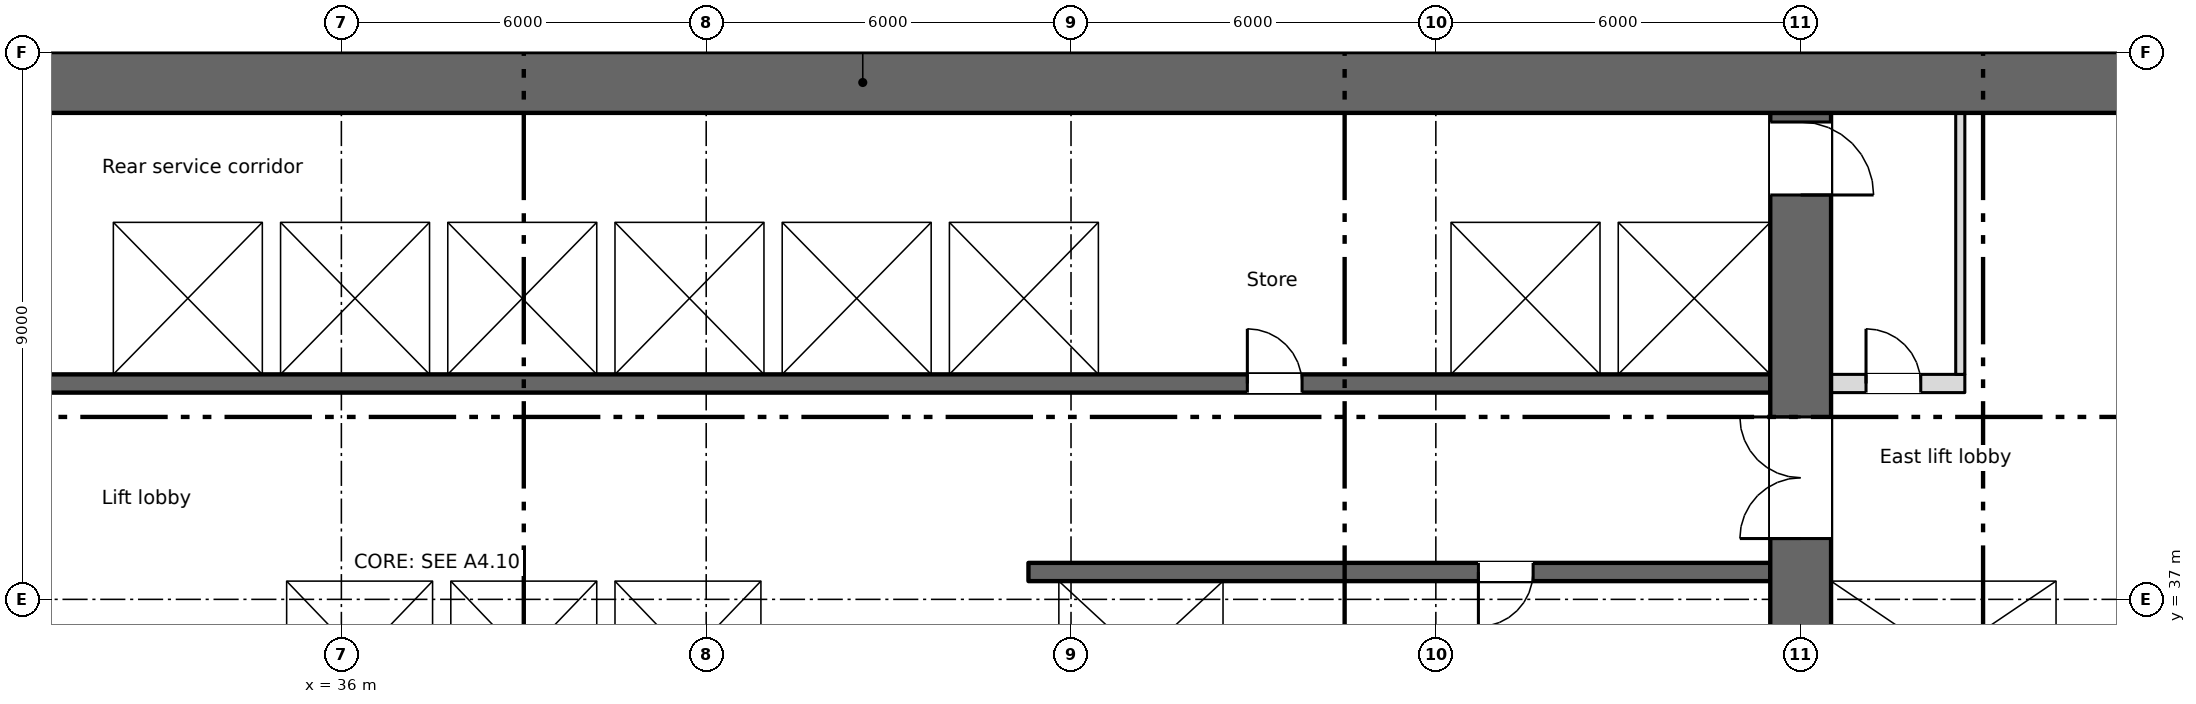
"""IFC4 building model, lengths in metres.
Left out: names, types, materials, properties, quantities, classifications, styles, units other than length and angle.
Written with IfcOpenShell. Run it as: python <this file> out.ifc"""

import sys

from ifc_helpers import new_model, si_unit, direction, frame, frame_2d, origin, place, context, subcontext, project, spatial, rectangle, extrude, element, fill, save


model = new_model("IFC4")
c1 = context("Model", 3, precision=1e-05, world=origin(), true_north=direction((0.0, 1.0)))
c2 = subcontext(c1, "Body", "Model", "MODEL_VIEW")
j1 = project(units=[si_unit("LENGTHUNIT", "METRE"), si_unit("PLANEANGLEUNIT", "RADIAN")], contexts=[c1])
p1 = place(None, origin())
s1 = spatial("IfcSite", under=j1, at=p1, CompositionType="ELEMENT")
p2 = place(p1, origin())
s2 = spatial("IfcBuilding", under=s1, at=p2, CompositionType="ELEMENT")
p3 = place(p2, frame((0.0, 0.0, 56.25)))
s3 = spatial("IfcBuildingStorey", under=s2, at=p3, CompositionType="ELEMENT", Elevation=56.25)
p4 = place(p3, frame((5.55, 45.5, 0.0), z_axis=(0.0, 0.0, 1.0), x_axis=(1.0, 0.0, 0.0)))
e1 = element("IfcWall", 1, at=p4, inside=s3, PredefinedType="SHEAR", context=c2, shape_type="SweptSolid", body=[
    extrude(rectangle(XDim=66.9, YDim=1.0, at=frame_2d((33.45, 0.0))), origin(), (0.0, 0.0, 1.0), 3.35),
])
p5 = place(p4, frame((1.2, 0.0, 0.6)))
e2 = element("IfcOpeningElement", 2, at=p5, cuts=e1, PredefinedType="OPENING", context=c2, shape_type="SweptSolid", body=[
    extrude(rectangle(XDim=0.6, YDim=2.4, at=frame_2d((0.3, 1.2))), frame((0.0, 0.51, 0.0), z_axis=(0.0, -1.0, 0.0), x_axis=(1.0, 0.0, 0.0)), (0.0, 0.0, 1.0), 1.02),
])
p6 = place(p4, frame((7.2, 0.0, 0.6)))
e3 = element("IfcOpeningElement", 3, at=p6, cuts=e1, PredefinedType="OPENING", context=c2, shape_type="SweptSolid", body=[
    extrude(rectangle(XDim=0.6, YDim=2.4, at=frame_2d((0.3, 1.2))), frame((0.0, 0.51, 0.0), z_axis=(0.0, -1.0, 0.0), x_axis=(1.0, 0.0, 0.0)), (0.0, 0.0, 1.0), 1.02),
])
p7 = place(p4, frame((61.2, 0.0, 0.6)))
e4 = element("IfcOpeningElement", 4, at=p7, cuts=e1, PredefinedType="OPENING", context=c2, shape_type="SweptSolid", body=[
    extrude(rectangle(XDim=0.6, YDim=2.4, at=frame_2d((0.3, 1.2))), frame((0.0, 0.51, 0.0), z_axis=(0.0, -1.0, 0.0), x_axis=(1.0, 0.0, 0.0)), (0.0, 0.0, 1.0), 1.02),
])
p8 = place(p3, frame((64.35, 34.8, 0.0), z_axis=(0.0, 0.0, 1.0), x_axis=(0.0, 1.0, 0.0)))
e5 = element("IfcWall", 5, at=p8, inside=s3, PredefinedType="SHEAR", context=c2, shape_type="SweptSolid", body=[
    extrude(rectangle(XDim=10.2, YDim=0.3, at=frame_2d((5.1, 0.0))), origin(), (0.0, 0.0, 1.0), 3.35),
])
p9 = place(p3, frame((60.0, 28.4, 0.0), z_axis=(0.0, 0.0, 1.0), x_axis=(0.0, 1.0, 0.0)))
e6 = element("IfcWall", 6, at=p9, inside=s3, PredefinedType="SHEAR", context=c2, shape_type="SweptSolid", body=[
    extrude(rectangle(XDim=16.6, YDim=1.0, at=frame_2d((8.3, 0.0))), origin(), (0.0, 0.0, 1.0), 3.35),
])
p10 = place(p9, frame((9.6, 0.0, 0.0)))
e7 = element("IfcOpeningElement", 7, at=p10, cuts=e6, PredefinedType="OPENING", context=c2, shape_type="SweptSolid", body=[
    extrude(rectangle(XDim=2.0, YDim=2.1, at=frame_2d((1.0, 1.05))), frame((0.0, 0.51, 0.0), z_axis=(0.0, -1.0, 0.0), x_axis=(1.0, 0.0, 0.0)), (0.0, 0.0, 1.0), 1.02),
])
p11 = place(p9, frame((15.25, 0.0, 0.0)))
e8 = element("IfcOpeningElement", 8, at=p11, cuts=e6, PredefinedType="OPENING", context=c2, shape_type="SweptSolid", body=[
    extrude(rectangle(XDim=1.2, YDim=2.1, at=frame_2d((0.6, 1.05))), frame((0.0, 0.51, 0.0), z_axis=(0.0, -1.0, 0.0), x_axis=(1.0, 0.0, 0.0)), (0.0, 0.0, 1.0), 1.02),
])
p12 = place(p3, frame((34.8, 37.45, 0.0), z_axis=(0.0, 0.0, 1.0), x_axis=(1.0, 0.0, 0.0)))
e9 = element("IfcWall", 9, at=p12, inside=s3, PredefinedType="SHEAR", context=c2, shape_type="SweptSolid", body=[
    extrude(rectangle(XDim=8.4, YDim=0.3, at=frame_2d((4.2, 0.0))), origin(), (0.0, 0.0, 1.0), 3.35),
])
p13 = place(p12, frame((0.95, 0.0, 0.0)))
e10 = element("IfcOpeningElement", 10, at=p13, cuts=e9, PredefinedType="OPENING", context=c2, shape_type="SweptSolid", body=[
    extrude(rectangle(XDim=1.1, YDim=2.1, at=frame_2d((0.55, 1.05))), frame((0.0, 0.16, 0.0), z_axis=(0.0, -1.0, 0.0), x_axis=(1.0, 0.0, 0.0)), (0.0, 0.0, 1.0), 0.32),
])
p14 = place(p12, frame((3.65, 0.0, 0.0)))
e11 = element("IfcOpeningElement", 11, at=p14, cuts=e9, PredefinedType="OPENING", context=c2, shape_type="SweptSolid", body=[
    extrude(rectangle(XDim=1.1, YDim=2.1, at=frame_2d((0.55, 1.05))), frame((0.0, 0.16, 0.0), z_axis=(0.0, -1.0, 0.0), x_axis=(1.0, 0.0, 0.0)), (0.0, 0.0, 1.0), 0.32),
])
p15 = place(p12, frame((6.35, 0.0, 0.0)))
e12 = element("IfcOpeningElement", 12, at=p15, cuts=e9, PredefinedType="OPENING", context=c2, shape_type="SweptSolid", body=[
    extrude(rectangle(XDim=1.1, YDim=2.1, at=frame_2d((0.55, 1.05))), frame((0.0, 0.16, 0.0), z_axis=(0.0, -1.0, 0.0), x_axis=(1.0, 0.0, 0.0)), (0.0, 0.0, 1.0), 0.32),
])
p16 = place(p3, frame((59.5, 37.45, 0.0), z_axis=(0.0, 0.0, 1.0), x_axis=(-1.0, 0.0, 0.0)))
e13 = element("IfcWall", 13, at=p16, inside=s3, PredefinedType="SHEAR", context=c2, shape_type="SweptSolid", body=[
    extrude(rectangle(XDim=12.2, YDim=0.3, at=frame_2d((6.1, 0.0))), origin(), (0.0, 0.0, 1.0), 3.35),
])
p17 = place(p16, frame((3.9, 0.0, 0.0)))
e14 = element("IfcOpeningElement", 14, at=p17, cuts=e13, PredefinedType="OPENING", context=c2, shape_type="SweptSolid", body=[
    extrude(rectangle(XDim=0.9, YDim=2.1, at=frame_2d((0.45, 1.05))), frame((0.0, 0.16, 0.0), z_axis=(0.0, -1.0, 0.0), x_axis=(1.0, 0.0, 0.0)), (0.0, 0.0, 1.0), 0.32),
])
p18 = place(p3, frame((60.5, 37.45, 0.0), z_axis=(0.0, 0.0, 1.0), x_axis=(1.0, 0.0, 0.0)))
e15 = element("IfcWall", 15, at=p18, inside=s3, PredefinedType="SHEAR", context=c2, shape_type="SweptSolid", body=[
    extrude(rectangle(XDim=3.7, YDim=0.3, at=frame_2d((1.85, 0.0))), origin(), (0.0, 0.0, 1.0), 3.35),
])
p19 = place(p18, frame((1.3, 0.0, 0.0)))
e16 = element("IfcOpeningElement", 16, at=p19, cuts=e15, PredefinedType="OPENING", context=c2, shape_type="SweptSolid", body=[
    extrude(rectangle(XDim=1.1, YDim=2.1, at=frame_2d((0.55, 1.05))), frame((0.0, 0.16, 0.0), z_axis=(0.0, -1.0, 0.0), x_axis=(1.0, 0.0, 0.0)), (0.0, 0.0, 1.0), 0.32),
])
for number, where, z_axis, x_axis in (
    (17, (34.95, 34.8, 0.0), (0.0, 0.0, 1.0), (0.0, 1.0, 0.0)),
    (18, (43.05, 34.8, 0.0), (0.0, 0.0, 1.0), (0.0, 1.0, 0.0)),
):
    element("IfcWall", number, at=place(p3, frame(where, z_axis=z_axis, x_axis=x_axis)), inside=s3, PredefinedType="SHEAR", context=c2, shape_type="SweptSolid", body=[
        extrude(rectangle(XDim=2.5, YDim=0.3, at=frame_2d((1.25, 0.0))), origin(), (0.0, 0.0, 1.0), 3.35),
    ])
p20 = place(p3, frame((47.55, 34.8, 0.0), z_axis=(0.0, 0.0, 1.0), x_axis=(0.0, 1.0, 0.0)))
e19 = element("IfcWall", 19, at=p20, inside=s3, PredefinedType="SHEAR", context=c2, shape_type="SweptSolid", body=[
    extrude(rectangle(XDim=2.5, YDim=0.5, at=frame_2d((1.25, 0.0))), origin(), (0.0, 0.0, 1.0), 3.35),
])
p21 = place(p3, frame((50.65, 34.8, 0.0), z_axis=(0.0, 0.0, 1.0), x_axis=(0.0, 1.0, 0.0)))
e20 = element("IfcWall", 20, at=p21, inside=s3, PredefinedType="SHEAR", context=c2, shape_type="SweptSolid", body=[
    extrude(rectangle(XDim=2.5, YDim=0.3, at=frame_2d((1.25, 0.0))), origin(), (0.0, 0.0, 1.0), 3.35),
])
p22 = place(p3, frame((18.5, 40.55, 0.0), z_axis=(0.0, 0.0, 1.0), x_axis=(1.0, 0.0, 0.0)))
e21 = element("IfcWall", 21, at=p22, inside=s3, PredefinedType="SHEAR", context=c2, shape_type="SweptSolid", body=[
    extrude(rectangle(XDim=41.0, YDim=0.3, at=frame_2d((20.5, 0.0))), origin(), (0.0, 0.0, 1.0), 3.35),
])
p23 = place(p22, frame((9.025, 0.0, 0.0)))
e22 = element("IfcOpeningElement", 22, at=p23, cuts=e21, PredefinedType="OPENING", context=c2, shape_type="SweptSolid", body=[
    extrude(rectangle(XDim=0.9, YDim=2.1, at=frame_2d((0.45, 1.05))), frame((0.0, 0.16, 0.0), z_axis=(0.0, -1.0, 0.0), x_axis=(1.0, 0.0, 0.0)), (0.0, 0.0, 1.0), 0.32),
])
p24 = place(p22, frame((32.4, 0.0, 0.0)))
e23 = element("IfcOpeningElement", 23, at=p24, cuts=e21, PredefinedType="OPENING", context=c2, shape_type="SweptSolid", body=[
    extrude(rectangle(XDim=0.9, YDim=2.1, at=frame_2d((0.45, 1.05))), frame((0.0, 0.16, 0.0), z_axis=(0.0, -1.0, 0.0), x_axis=(1.0, 0.0, 0.0)), (0.0, 0.0, 1.0), 0.32),
])
p25 = place(p22, frame((14.425, 0.0, 0.0)))
e24 = element("IfcOpeningElement", 24, at=p25, cuts=e21, PredefinedType="OPENING", context=c2, shape_type="SweptSolid", body=[
    extrude(rectangle(XDim=1.1, YDim=2.1, at=frame_2d((0.55, 1.05))), frame((0.0, 0.16, 0.0), z_axis=(0.0, -1.0, 0.0), x_axis=(1.0, 0.0, 0.0)), (0.0, 0.0, 1.0), 0.32),
])
p26 = place(p22, frame((17.175, 0.0, 0.0)))
e25 = element("IfcOpeningElement", 25, at=p26, cuts=e21, PredefinedType="OPENING", context=c2, shape_type="SweptSolid", body=[
    extrude(rectangle(XDim=1.1, YDim=2.1, at=frame_2d((0.55, 1.05))), frame((0.0, 0.16, 0.0), z_axis=(0.0, -1.0, 0.0), x_axis=(1.0, 0.0, 0.0)), (0.0, 0.0, 1.0), 0.32),
])
p27 = place(p22, frame((19.925, 0.0, 0.0)))
e26 = element("IfcOpeningElement", 26, at=p27, cuts=e21, PredefinedType="OPENING", context=c2, shape_type="SweptSolid", body=[
    extrude(rectangle(XDim=1.1, YDim=2.1, at=frame_2d((0.55, 1.05))), frame((0.0, 0.16, 0.0), z_axis=(0.0, -1.0, 0.0), x_axis=(1.0, 0.0, 0.0)), (0.0, 0.0, 1.0), 0.32),
])
p28 = place(p22, frame((22.675, 0.0, 0.0)))
e27 = element("IfcOpeningElement", 27, at=p28, cuts=e21, PredefinedType="OPENING", context=c2, shape_type="SweptSolid", body=[
    extrude(rectangle(XDim=1.1, YDim=2.1, at=frame_2d((0.55, 1.05))), frame((0.0, 0.16, 0.0), z_axis=(0.0, -1.0, 0.0), x_axis=(1.0, 0.0, 0.0)), (0.0, 0.0, 1.0), 0.32),
])
p29 = place(p22, frame((36.375, 0.0, 0.0)))
e28 = element("IfcOpeningElement", 28, at=p29, cuts=e21, PredefinedType="OPENING", context=c2, shape_type="SweptSolid", body=[
    extrude(rectangle(XDim=1.2, YDim=2.1, at=frame_2d((0.6, 1.05))), frame((0.0, 0.16, 0.0), z_axis=(0.0, -1.0, 0.0), x_axis=(1.0, 0.0, 0.0)), (0.0, 0.0, 1.0), 0.32),
])
p30 = place(p22, frame((39.15, 0.0, 0.0)))
e29 = element("IfcOpeningElement", 29, at=p30, cuts=e21, PredefinedType="OPENING", context=c2, shape_type="SweptSolid", body=[
    extrude(rectangle(XDim=1.2, YDim=2.1, at=frame_2d((0.6, 1.05))), frame((0.0, 0.16, 0.0), z_axis=(0.0, -1.0, 0.0), x_axis=(1.0, 0.0, 0.0)), (0.0, 0.0, 1.0), 0.32),
])
p31 = place(p3, frame((18.5, 43.35, 0.0), z_axis=(0.0, 0.0, 1.0), x_axis=(1.0, 0.0, 0.0)))
e30 = element("IfcWall", 30, at=p31, inside=s3, PredefinedType="SHEAR", context=c2, shape_type="SweptSolid", body=[
    extrude(rectangle(XDim=41.0, YDim=0.3, at=frame_2d((20.5, 0.0))), origin(), (0.0, 0.0, 1.0), 3.35),
])
p32 = place(p3, frame((60.5, 40.55, 0.0), z_axis=(0.0, 0.0, 1.0), x_axis=(1.0, 0.0, 0.0)))
e31 = element("IfcWall", 31, at=p32, inside=s3, PredefinedType="PARTITIONING", context=c2, shape_type="SweptSolid", body=[
    extrude(rectangle(XDim=2.2, YDim=0.3, at=frame_2d((1.1, 0.0))), origin(), (0.0, 0.0, 1.0), 3.35),
])
p33 = place(p32, frame((0.575, 0.0, 0.0)))
e32 = element("IfcOpeningElement", 32, at=p33, cuts=e31, PredefinedType="OPENING", context=c2, shape_type="SweptSolid", body=[
    extrude(rectangle(XDim=0.9, YDim=2.1, at=frame_2d((0.45, 1.05))), frame((0.0, 0.16, 0.0), z_axis=(0.0, -1.0, 0.0), x_axis=(1.0, 0.0, 0.0)), (0.0, 0.0, 1.0), 0.32),
])
for number, where, z_axis, x_axis in (
    (33, (37.65, 34.8, 0.0), (0.0, 0.0, 1.0), (0.0, 1.0, 0.0)),
    (34, (40.35, 34.8, 0.0), (0.0, 0.0, 1.0), (0.0, 1.0, 0.0)),
    (35, (32.1, 40.7, 0.0), (0.0, 0.0, 1.0), (0.0, 1.0, 0.0)),
    (36, (34.85, 40.7, 0.0), (0.0, 0.0, 1.0), (0.0, 1.0, 0.0)),
    (37, (37.6, 40.7, 0.0), (0.0, 0.0, 1.0), (0.0, 1.0, 0.0)),
    (38, (40.35, 40.7, 0.0), (0.0, 0.0, 1.0), (0.0, 1.0, 0.0)),
    (39, (43.1, 40.7, 0.0), (0.0, 0.0, 1.0), (0.0, 1.0, 0.0)),
    (40, (45.85, 40.7, 0.0), (0.0, 0.0, 1.0), (0.0, 1.0, 0.0)),
    (41, (48.6, 40.7, 0.0), (0.0, 0.0, 1.0), (0.0, 1.0, 0.0)),
    (42, (54.1, 40.7, 0.0), (0.0, 0.0, 1.0), (0.0, 1.0, 0.0)),
    (43, (56.85, 40.7, 0.0), (0.0, 0.0, 1.0), (0.0, 1.0, 0.0)),
):
    element("IfcWall", number, at=place(p3, frame(where, z_axis=z_axis, x_axis=x_axis)), inside=s3, PredefinedType="SHEAR", context=c2, shape_type="SweptSolid", body=[
        extrude(rectangle(XDim=2.5, YDim=0.3, at=frame_2d((1.25, 0.0))), origin(), (0.0, 0.0, 1.0), 3.35),
    ])
p34 = place(p3, frame((62.625, 40.7, 0.0), z_axis=(0.0, 0.0, 1.0), x_axis=(0.0, 1.0, 0.0)))
e44 = element("IfcWall", 44, at=p34, inside=s3, PredefinedType="PARTITIONING", context=c2, shape_type="SweptSolid", body=[
    extrude(rectangle(XDim=4.3, YDim=0.15, at=frame_2d((2.15, 0.0))), origin(), (0.0, 0.0, 1.0), 3.35),
])
p35 = place(p33, origin())
e45 = element("IfcDoor", 45, at=p35, inside=s3, OperationType="SINGLE_SWING_LEFT", PredefinedType="DOOR", context=c2, shape_type="SweptSolid", body=[
    extrude(rectangle(XDim=0.9, YDim=2.1, at=frame_2d((0.45, 1.05))), frame((0.0, 0.025, 0.0), z_axis=(0.0, -1.0, 0.0), x_axis=(1.0, 0.0, 0.0)), (0.0, 0.0, 1.0), 0.05),
])
fill(e32, e45)
p36 = place(p17, origin())
e46 = element("IfcDoor", 46, at=p36, inside=s3, OperationType="SINGLE_SWING_RIGHT", PredefinedType="DOOR", context=c2, shape_type="SweptSolid", body=[
    extrude(rectangle(XDim=0.9, YDim=2.1, at=frame_2d((0.45, 1.05))), frame((0.0, 0.025, 0.0), z_axis=(0.0, -1.0, 0.0), x_axis=(1.0, 0.0, 0.0)), (0.0, 0.0, 1.0), 0.05),
])
fill(e14, e46)
p37 = place(p24, origin())
e47 = element("IfcDoor", 47, at=p37, inside=s3, OperationType="SINGLE_SWING_LEFT", PredefinedType="DOOR", context=c2, shape_type="SweptSolid", body=[
    extrude(rectangle(XDim=0.9, YDim=2.1, at=frame_2d((0.45, 1.05))), frame((0.0, 0.025, 0.0), z_axis=(0.0, -1.0, 0.0), x_axis=(1.0, 0.0, 0.0)), (0.0, 0.0, 1.0), 0.05),
])
fill(e23, e47)
p38 = place(p13, origin())
e48 = element("IfcDoor", 48, at=p38, inside=s3, OperationType="SLIDING_TO_LEFT", PredefinedType="DOOR", context=c2, shape_type="SweptSolid", body=[
    extrude(rectangle(XDim=1.1, YDim=2.1, at=frame_2d((0.55, 1.05))), frame((0.0, 0.025, 0.0), z_axis=(0.0, -1.0, 0.0), x_axis=(1.0, 0.0, 0.0)), (0.0, 0.0, 1.0), 0.05),
])
fill(e10, e48)
p39 = place(p14, origin())
e49 = element("IfcDoor", 49, at=p39, inside=s3, OperationType="SLIDING_TO_LEFT", PredefinedType="DOOR", context=c2, shape_type="SweptSolid", body=[
    extrude(rectangle(XDim=1.1, YDim=2.1, at=frame_2d((0.55, 1.05))), frame((0.0, 0.025, 0.0), z_axis=(0.0, -1.0, 0.0), x_axis=(1.0, 0.0, 0.0)), (0.0, 0.0, 1.0), 0.05),
])
fill(e11, e49)
p40 = place(p15, origin())
e50 = element("IfcDoor", 50, at=p40, inside=s3, OperationType="SLIDING_TO_LEFT", PredefinedType="DOOR", context=c2, shape_type="SweptSolid", body=[
    extrude(rectangle(XDim=1.1, YDim=2.1, at=frame_2d((0.55, 1.05))), frame((0.0, 0.025, 0.0), z_axis=(0.0, -1.0, 0.0), x_axis=(1.0, 0.0, 0.0)), (0.0, 0.0, 1.0), 0.05),
])
fill(e12, e50)
p41 = place(p25, origin())
e51 = element("IfcDoor", 51, at=p41, inside=s3, OperationType="SLIDING_TO_LEFT", PredefinedType="DOOR", context=c2, shape_type="SweptSolid", body=[
    extrude(rectangle(XDim=1.1, YDim=2.1, at=frame_2d((0.55, 1.05))), frame((0.0, 0.025, 0.0), z_axis=(0.0, -1.0, 0.0), x_axis=(1.0, 0.0, 0.0)), (0.0, 0.0, 1.0), 0.05),
])
fill(e24, e51)
p42 = place(p26, origin())
e52 = element("IfcDoor", 52, at=p42, inside=s3, OperationType="SLIDING_TO_LEFT", PredefinedType="DOOR", context=c2, shape_type="SweptSolid", body=[
    extrude(rectangle(XDim=1.1, YDim=2.1, at=frame_2d((0.55, 1.05))), frame((0.0, 0.025, 0.0), z_axis=(0.0, -1.0, 0.0), x_axis=(1.0, 0.0, 0.0)), (0.0, 0.0, 1.0), 0.05),
])
fill(e25, e52)
p43 = place(p27, origin())
e53 = element("IfcDoor", 53, at=p43, inside=s3, OperationType="SLIDING_TO_LEFT", PredefinedType="DOOR", context=c2, shape_type="SweptSolid", body=[
    extrude(rectangle(XDim=1.1, YDim=2.1, at=frame_2d((0.55, 1.05))), frame((0.0, 0.025, 0.0), z_axis=(0.0, -1.0, 0.0), x_axis=(1.0, 0.0, 0.0)), (0.0, 0.0, 1.0), 0.05),
])
fill(e26, e53)
p44 = place(p28, origin())
e54 = element("IfcDoor", 54, at=p44, inside=s3, OperationType="SLIDING_TO_LEFT", PredefinedType="DOOR", context=c2, shape_type="SweptSolid", body=[
    extrude(rectangle(XDim=1.1, YDim=2.1, at=frame_2d((0.55, 1.05))), frame((0.0, 0.025, 0.0), z_axis=(0.0, -1.0, 0.0), x_axis=(1.0, 0.0, 0.0)), (0.0, 0.0, 1.0), 0.05),
])
fill(e27, e54)
p45 = place(p29, origin())
e55 = element("IfcDoor", 55, at=p45, inside=s3, OperationType="SLIDING_TO_LEFT", PredefinedType="DOOR", context=c2, shape_type="SweptSolid", body=[
    extrude(rectangle(XDim=1.2, YDim=2.1, at=frame_2d((0.6, 1.05))), frame((0.0, 0.025, 0.0), z_axis=(0.0, -1.0, 0.0), x_axis=(1.0, 0.0, 0.0)), (0.0, 0.0, 1.0), 0.05),
])
fill(e28, e55)
p46 = place(p30, origin())
e56 = element("IfcDoor", 56, at=p46, inside=s3, OperationType="SLIDING_TO_LEFT", PredefinedType="DOOR", context=c2, shape_type="SweptSolid", body=[
    extrude(rectangle(XDim=1.2, YDim=2.1, at=frame_2d((0.6, 1.05))), frame((0.0, 0.025, 0.0), z_axis=(0.0, -1.0, 0.0), x_axis=(1.0, 0.0, 0.0)), (0.0, 0.0, 1.0), 0.05),
])
fill(e29, e56)
p47 = place(p19, origin())
e57 = element("IfcDoor", 57, at=p47, inside=s3, OperationType="SLIDING_TO_LEFT", PredefinedType="DOOR", context=c2, shape_type="SweptSolid", body=[
    extrude(rectangle(XDim=1.1, YDim=2.1, at=frame_2d((0.55, 1.05))), frame((0.0, 0.025, 0.0), z_axis=(0.0, -1.0, 0.0), x_axis=(1.0, 0.0, 0.0)), (0.0, 0.0, 1.0), 0.05),
])
fill(e16, e57)
p48 = place(p10, origin())
e58 = element("IfcDoor", 58, at=p48, inside=s3, OperationType="DOUBLE_DOOR_SINGLE_SWING", PredefinedType="DOOR", context=c2, shape_type="SweptSolid", body=[
    extrude(rectangle(XDim=2.0, YDim=2.1, at=frame_2d((1.0, 1.05))), frame((0.0, 0.025, 0.0), z_axis=(0.0, -1.0, 0.0), x_axis=(1.0, 0.0, 0.0)), (0.0, 0.0, 1.0), 0.05),
])
fill(e7, e58)
p49 = place(p11, origin())
e59 = element("IfcDoor", 59, at=p49, inside=s3, OperationType="SINGLE_SWING_LEFT", PredefinedType="DOOR", context=c2, shape_type="SweptSolid", body=[
    extrude(rectangle(XDim=1.2, YDim=2.1, at=frame_2d((0.6, 1.05))), frame((0.0, 0.025, 0.0), z_axis=(0.0, -1.0, 0.0), x_axis=(1.0, 0.0, 0.0)), (0.0, 0.0, 1.0), 0.05),
])
fill(e8, e59)
save(model, sys.argv[1])
